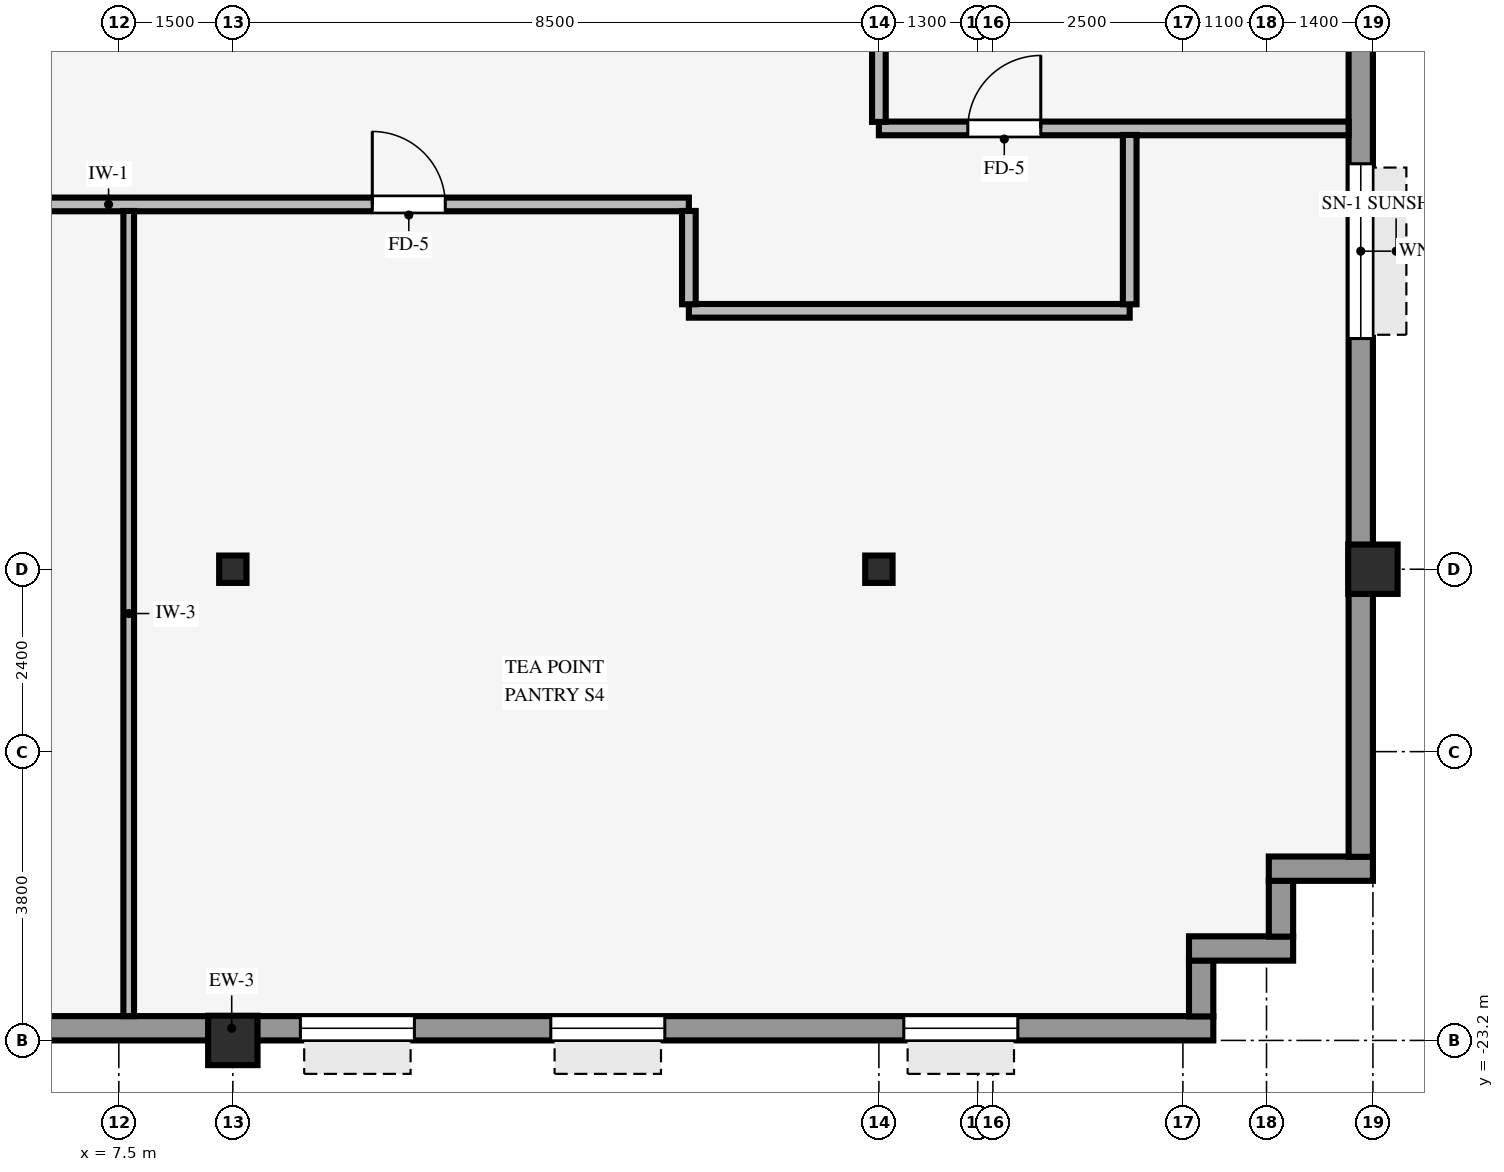
"""IFC4 building model, lengths in metres.
Left out: names, types, materials, properties, quantities, classifications, styles, units other than length and angle.
Written with IfcOpenShell. Run it as: python <this file> out.ifc"""

import sys

from ifc_helpers import new_model, si_unit, direction, frame, frame_2d, origin, origin_2d, place, context, subcontext, project, spatial, rectangle, hollow_rectangle, i_section, extrude, source, transform, mapped, element, fill, save


model = new_model("IFC4")
c1 = context("Model", 3, precision=1e-05, world=origin(), true_north=direction((0.0, 1.0)))
c2 = subcontext(c1, "Body", "Model", "MODEL_VIEW")
j1 = project(units=[si_unit("LENGTHUNIT", "METRE"), si_unit("PLANEANGLEUNIT", "RADIAN")], contexts=[c1])
p1 = place(None, origin())
s1 = spatial("IfcSite", under=j1, at=p1, CompositionType="ELEMENT")
p2 = place(p1, origin())
s2 = spatial("IfcBuilding", under=s1, at=p2, CompositionType="ELEMENT")
p3 = place(p2, frame((0.0, 0.0, 112.9)))
s3 = spatial("IfcBuildingStorey", under=s2, at=p3, CompositionType="ELEMENT", Elevation=112.9)
for number, where, z_axis, x_axis in (
    (1, (24.0, -17.0, 0.0), (0.0, 0.0, 1.0), (1.0, 0.0, 0.0)),
    (2, (9.0, -23.2, 0.0), (0.0, 0.0, 1.0), (1.0, 0.0, 0.0)),
):
    element("IfcColumn", number, at=place(p3, frame(where, z_axis=z_axis, x_axis=x_axis)), inside=s3, PredefinedType="COLUMN", context=c2, shape_type="SweptSolid", body=[
        extrude(hollow_rectangle(XDim=0.65, YDim=0.65, WallThickness=0.04, InnerFilletRadius=0.04, OuterFilletRadius=0.08, at=origin_2d()), origin(), (0.0, 0.0, 1.0), 3.25),
    ])
for number, where, z_axis, x_axis in (
    (3, (9.0, -17.0, 0.0), (0.0, 0.0, 1.0), (1.0, 0.0, 0.0)),
    (4, (17.5, -17.0, 0.0), (0.0, 0.0, 1.0), (1.0, 0.0, 0.0)),
):
    element("IfcColumn", number, at=place(p3, frame(where, z_axis=z_axis, x_axis=x_axis)), inside=s3, PredefinedType="COLUMN", context=c2, shape_type="SweptSolid", body=[
        extrude(i_section(OverallWidth=0.36, OverallDepth=0.36, WebThickness=0.021, FlangeThickness=0.021, FilletRadius=0.018, at=origin_2d()), origin(), (0.0, 0.0, 1.0), 3.25),
    ])
p4 = place(p3, frame((-21.9, -23.04, 0.0), z_axis=(0.0, 0.0, 1.0), x_axis=(1.0, 0.0, 0.0)))
e5 = element("IfcWall", 5, at=p4, inside=s3, PredefinedType="STANDARD", context=c2, shape_type="SweptSolid", body=[
    extrude(rectangle(XDim=43.8, YDim=0.32, at=frame_2d((21.9, 0.0))), origin(), (0.0, 0.0, 1.0), 2.585),
])
p5 = place(p4, frame((17.55, 0.0, 0.0), z_axis=(0.0, 0.0, 1.0), x_axis=(-1.0, 0.0, 0.0)))
e6 = element("IfcOpeningElement", 6, at=p5, cuts=e5, PredefinedType="OPENING", context=c2, shape_type="SweptSolid", body=[
    extrude(rectangle(XDim=1.05, YDim=2.1, at=frame_2d((0.525, 1.05))), frame((0.0, 0.17, 0.0), z_axis=(0.0, -1.0, 0.0), x_axis=(1.0, 0.0, 0.0)), (0.0, 0.0, 1.0), 0.34),
])
p6 = place(p4, frame((2.572, 0.0, 0.8)))
e7 = element("IfcOpeningElement", 7, at=p6, cuts=e5, PredefinedType="OPENING", context=c2, shape_type="SweptSolid", body=[
    extrude(rectangle(XDim=1.5, YDim=1.6, at=frame_2d((0.75, 0.8))), frame((0.0, 0.17, 0.0), z_axis=(0.0, -1.0, 0.0), x_axis=(1.0, 0.0, 0.0)), (0.0, 0.0, 1.0), 0.34),
])
p7 = place(p4, frame((6.767, 0.0, 0.8)))
e8 = element("IfcOpeningElement", 8, at=p7, cuts=e5, PredefinedType="OPENING", context=c2, shape_type="SweptSolid", body=[
    extrude(rectangle(XDim=1.5, YDim=1.6, at=frame_2d((0.75, 0.8))), frame((0.0, 0.17, 0.0), z_axis=(0.0, -1.0, 0.0), x_axis=(1.0, 0.0, 0.0)), (0.0, 0.0, 1.0), 0.34),
])
p8 = place(p4, frame((10.511, 0.0, 0.8)))
e9 = element("IfcOpeningElement", 9, at=p8, cuts=e5, PredefinedType="OPENING", context=c2, shape_type="SweptSolid", body=[
    extrude(rectangle(XDim=1.5, YDim=1.6, at=frame_2d((0.75, 0.8))), frame((0.0, 0.17, 0.0), z_axis=(0.0, -1.0, 0.0), x_axis=(1.0, 0.0, 0.0)), (0.0, 0.0, 1.0), 0.34),
])
p9 = place(p4, frame((25.794, 0.0, 0.8)))
e10 = element("IfcOpeningElement", 10, at=p9, cuts=e5, PredefinedType="OPENING", context=c2, shape_type="SweptSolid", body=[
    extrude(rectangle(XDim=1.5, YDim=1.6, at=frame_2d((0.75, 0.8))), frame((0.0, 0.17, 0.0), z_axis=(0.0, -1.0, 0.0), x_axis=(1.0, 0.0, 0.0)), (0.0, 0.0, 1.0), 0.34),
])
p10 = place(p4, frame((31.789, 0.0, 0.8)))
e11 = element("IfcOpeningElement", 11, at=p10, cuts=e5, PredefinedType="OPENING", context=c2, shape_type="SweptSolid", body=[
    extrude(rectangle(XDim=1.5, YDim=1.6, at=frame_2d((0.75, 0.8))), frame((0.0, 0.17, 0.0), z_axis=(0.0, -1.0, 0.0), x_axis=(1.0, 0.0, 0.0)), (0.0, 0.0, 1.0), 0.34),
])
p11 = place(p4, frame((35.083, 0.0, 0.8)))
e12 = element("IfcOpeningElement", 12, at=p11, cuts=e5, PredefinedType="OPENING", context=c2, shape_type="SweptSolid", body=[
    extrude(rectangle(XDim=1.5, YDim=1.6, at=frame_2d((0.75, 0.8))), frame((0.0, 0.17, 0.0), z_axis=(0.0, -1.0, 0.0), x_axis=(1.0, 0.0, 0.0)), (0.0, 0.0, 1.0), 0.34),
])
p12 = place(p4, frame((39.728, 0.0, 0.8)))
e13 = element("IfcOpeningElement", 13, at=p12, cuts=e5, PredefinedType="OPENING", context=c2, shape_type="SweptSolid", body=[
    extrude(rectangle(XDim=1.5, YDim=1.6, at=frame_2d((0.75, 0.8))), frame((0.0, 0.17, 0.0), z_axis=(0.0, -1.0, 0.0), x_axis=(1.0, 0.0, 0.0)), (0.0, 0.0, 1.0), 0.34),
])
p13 = place(p3, frame((21.74, -22.884, 0.0), z_axis=(0.0, 0.0, 1.0), x_axis=(0.0, 1.0, 0.0)))
e14 = element("IfcWall", 14, at=p13, inside=s3, PredefinedType="STANDARD", context=c2, shape_type="SweptSolid", body=[
    extrude(rectangle(XDim=0.738, YDim=0.32, at=frame_2d((0.369, 0.0))), origin(), (0.0, 0.0, 1.0), 3.24),
])
p14 = place(p3, frame((21.58, -21.99, 0.0), z_axis=(0.0, 0.0, 1.0), x_axis=(1.0, 0.0, 0.0)))
e15 = element("IfcWall", 15, at=p14, inside=s3, PredefinedType="STANDARD", context=c2, shape_type="SweptSolid", body=[
    extrude(rectangle(XDim=1.37, YDim=0.32, at=frame_2d((0.685, 0.0))), origin(), (0.0, 0.0, 1.0), 3.24),
])
p15 = place(p3, frame((22.79, -21.834, 0.0), z_axis=(0.0, 0.0, 1.0), x_axis=(0.0, 1.0, 0.0)))
e16 = element("IfcWall", 16, at=p15, inside=s3, PredefinedType="STANDARD", context=c2, shape_type="SweptSolid", body=[
    extrude(rectangle(XDim=0.738, YDim=0.32, at=frame_2d((0.369, 0.0))), origin(), (0.0, 0.0, 1.0), 3.24),
])
p16 = place(p3, frame((22.63, -20.94, 0.0), z_axis=(0.0, 0.0, 1.0), x_axis=(1.0, 0.0, 0.0)))
e17 = element("IfcWall", 17, at=p16, inside=s3, PredefinedType="STANDARD", context=c2, shape_type="SweptSolid", body=[
    extrude(rectangle(XDim=1.37, YDim=0.32, at=frame_2d((0.685, 0.0))), origin(), (0.0, 0.0, 1.0), 3.24),
])
p17 = place(p3, frame((23.84, -20.784, 0.0), z_axis=(0.0, 0.0, 1.0), x_axis=(0.0, 1.0, 0.0)))
e18 = element("IfcWall", 18, at=p17, inside=s3, PredefinedType="STANDARD", context=c2, shape_type="SweptSolid", body=[
    extrude(rectangle(XDim=41.568, YDim=0.32, at=frame_2d((20.784, 0.0))), origin(), (0.0, 0.0, 1.0), 3.24),
])
p18 = place(p17, frame((6.819, 0.0, 0.8)))
e19 = element("IfcOpeningElement", 19, at=p18, cuts=e18, PredefinedType="OPENING", context=c2, shape_type="SweptSolid", body=[
    extrude(rectangle(XDim=2.3, YDim=1.62, at=frame_2d((1.15, 0.81))), frame((0.0, 0.17, 0.0), z_axis=(0.0, -1.0, 0.0), x_axis=(1.0, 0.0, 0.0)), (0.0, 0.0, 1.0), 0.34),
])
p19 = place(p17, frame((17.161, 0.0, 0.8)))
e20 = element("IfcOpeningElement", 20, at=p19, cuts=e18, PredefinedType="OPENING", context=c2, shape_type="SweptSolid", body=[
    extrude(rectangle(XDim=2.3, YDim=1.62, at=frame_2d((1.15, 0.81))), frame((0.0, 0.17, 0.0), z_axis=(0.0, -1.0, 0.0), x_axis=(1.0, 0.0, 0.0)), (0.0, 0.0, 1.0), 0.34),
])
p20 = place(p17, frame((22.107, 0.0, 0.8)))
e21 = element("IfcOpeningElement", 21, at=p20, cuts=e18, PredefinedType="OPENING", context=c2, shape_type="SweptSolid", body=[
    extrude(rectangle(XDim=2.3, YDim=1.62, at=frame_2d((1.15, 0.81))), frame((0.0, 0.17, 0.0), z_axis=(0.0, -1.0, 0.0), x_axis=(1.0, 0.0, 0.0)), (0.0, 0.0, 1.0), 0.34),
])
p21 = place(p17, frame((32.449, 0.0, 0.8)))
e22 = element("IfcOpeningElement", 22, at=p21, cuts=e18, PredefinedType="OPENING", context=c2, shape_type="SweptSolid", body=[
    extrude(rectangle(XDim=2.3, YDim=1.62, at=frame_2d((1.15, 0.81))), frame((0.0, 0.17, 0.0), z_axis=(0.0, -1.0, 0.0), x_axis=(1.0, 0.0, 0.0)), (0.0, 0.0, 1.0), 0.34),
])
p22 = place(p3, frame((15.0, -13.6, 0.0), z_axis=(0.0, 0.0, 1.0), x_axis=(1.0, 0.0, 0.0)))
e23 = element("IfcWall", 23, at=p22, inside=s3, PredefinedType="PARTITIONING", context=c2, shape_type="SweptSolid", body=[
    extrude(rectangle(XDim=5.8, YDim=0.18, at=frame_2d((2.9, 0.0))), origin(), (0.0, 0.0, 1.0), 2.878),
])
p23 = place(p3, frame((-15.0, -12.2, 0.0), z_axis=(0.0, 0.0, 1.0), x_axis=(1.0, 0.0, 0.0)))
e24 = element("IfcWall", 24, at=p23, inside=s3, PredefinedType="PARTITIONING", context=c2, shape_type="SweptSolid", body=[
    extrude(rectangle(XDim=30.0, YDim=0.18, at=frame_2d((15.0, 0.0))), origin(), (0.0, 0.0, 1.0), 3.24),
])
p24 = place(p23, frame((17.935, 0.0, 0.0)))
e25 = element("IfcOpeningElement", 25, at=p24, cuts=e24, PredefinedType="OPENING", context=c2, shape_type="SweptSolid", body=[
    extrude(rectangle(XDim=0.96, YDim=2.1, at=frame_2d((0.48, 1.05))), frame((0.0, 0.1, 0.0), z_axis=(0.0, -1.0, 0.0), x_axis=(1.0, 0.0, 0.0)), (0.0, 0.0, 1.0), 0.2),
])
p25 = place(p23, frame((25.835, 0.0, 0.0)))
e26 = element("IfcOpeningElement", 26, at=p25, cuts=e24, PredefinedType="OPENING", context=c2, shape_type="SweptSolid", body=[
    extrude(rectangle(XDim=0.96, YDim=2.1, at=frame_2d((0.48, 1.05))), frame((0.0, 0.1, 0.0), z_axis=(0.0, -1.0, 0.0), x_axis=(1.0, 0.0, 0.0)), (0.0, 0.0, 1.0), 0.2),
])
p26 = place(p23, frame((5.45, 0.0, 0.0)))
e27 = element("IfcOpeningElement", 27, at=p26, cuts=e24, PredefinedType="OPENING", context=c2, shape_type="SweptSolid", body=[
    extrude(rectangle(XDim=0.9, YDim=2.1, at=frame_2d((0.45, 1.05))), frame((0.0, 0.1, 0.0), z_axis=(0.0, -1.0, 0.0), x_axis=(1.0, 0.0, 0.0)), (0.0, 0.0, 1.0), 0.2),
])
p27 = place(p23, frame((2.85, 0.0, 0.0)))
e28 = element("IfcOpeningElement", 28, at=p27, cuts=e24, PredefinedType="OPENING", context=c2, shape_type="SweptSolid", body=[
    extrude(rectangle(XDim=0.9, YDim=2.1, at=frame_2d((0.45, 1.05))), frame((0.0, 0.1, 0.0), z_axis=(0.0, -1.0, 0.0), x_axis=(1.0, 0.0, 0.0)), (0.0, 0.0, 1.0), 0.2),
])
p28 = place(p23, frame((12.52, 0.0, 0.0)))
e29 = element("IfcOpeningElement", 29, at=p28, cuts=e24, PredefinedType="OPENING", context=c2, shape_type="SweptSolid", body=[
    extrude(rectangle(XDim=0.96, YDim=2.1, at=frame_2d((0.48, 1.05))), frame((0.0, 0.1, 0.0), z_axis=(0.0, -1.0, 0.0), x_axis=(1.0, 0.0, 0.0)), (0.0, 0.0, 1.0), 0.2),
])
p29 = place(p23, frame((7.95, 0.0, 0.0)))
e30 = element("IfcOpeningElement", 30, at=p29, cuts=e24, PredefinedType="OPENING", context=c2, shape_type="SweptSolid", body=[
    extrude(rectangle(XDim=0.9, YDim=2.1, at=frame_2d((0.45, 1.05))), frame((0.0, 0.1, 0.0), z_axis=(0.0, -1.0, 0.0), x_axis=(1.0, 0.0, 0.0)), (0.0, 0.0, 1.0), 0.2),
])
p30 = place(p3, frame((17.5, -11.2, 0.0), z_axis=(0.0, 0.0, 1.0), x_axis=(1.0, 0.0, 0.0)))
e31 = element("IfcWall", 31, at=p30, inside=s3, PredefinedType="PARTITIONING", context=c2, shape_type="SweptSolid", body=[
    extrude(rectangle(XDim=6.18, YDim=0.18, at=frame_2d((3.09, 0.0))), origin(), (0.0, 0.0, 1.0), 3.24),
])
p31 = place(p30, frame((1.17, 0.0, 0.0)))
e32 = element("IfcOpeningElement", 32, at=p31, cuts=e31, PredefinedType="OPENING", context=c2, shape_type="SweptSolid", body=[
    extrude(rectangle(XDim=0.96, YDim=2.1, at=frame_2d((0.48, 1.05))), frame((0.0, 0.1, 0.0), z_axis=(0.0, -1.0, 0.0), x_axis=(1.0, 0.0, 0.0)), (0.0, 0.0, 1.0), 0.2),
])
p32 = place(p3, frame((7.63, -22.88, 0.0), z_axis=(0.0, 0.0, 1.0), x_axis=(0.0, 1.0, 0.0)))
e33 = element("IfcWall", 33, at=p32, inside=s3, PredefinedType="PARTITIONING", context=c2, shape_type="SweptSolid", body=[
    extrude(rectangle(XDim=10.594, YDim=0.14, at=frame_2d((5.297, 0.0))), origin(), (0.0, 0.0, 1.0), 3.24),
])
p33 = place(p3, frame((15.0, -13.514, 0.0), z_axis=(0.0, 0.0, 1.0), x_axis=(0.0, 1.0, 0.0)))
e34 = element("IfcWall", 34, at=p33, inside=s3, PredefinedType="PARTITIONING", context=c2, shape_type="SweptSolid", body=[
    extrude(rectangle(XDim=1.228, YDim=0.18, at=frame_2d((0.614, 0.0))), origin(), (0.0, 0.0, 1.0), 3.24),
])
p34 = place(p3, frame((17.5, -11.114, 0.0), z_axis=(0.0, 0.0, 1.0), x_axis=(0.0, 1.0, 0.0)))
e35 = element("IfcWall", 35, at=p34, inside=s3, PredefinedType="PARTITIONING", context=c2, shape_type="SweptSolid", body=[
    extrude(rectangle(XDim=0.968, YDim=0.18, at=frame_2d((0.484, 0.0))), origin(), (0.0, 0.0, 1.0), 2.618),
])
p35 = place(p3, frame((20.8, -13.514, 0.0), z_axis=(0.0, 0.0, 1.0), x_axis=(0.0, 1.0, 0.0)))
e36 = element("IfcWall", 36, at=p35, inside=s3, PredefinedType="PARTITIONING", context=c2, shape_type="SweptSolid", body=[
    extrude(rectangle(XDim=2.228, YDim=0.18, at=frame_2d((1.114, 0.0))), origin(), (0.0, 0.0, 1.0), 3.24),
])
m1 = source(origin(), c2, "Body", "SweptSolid", [
    extrude(rectangle(XDim=1.5, YDim=1.6, at=frame_2d((0.75, 0.8))), frame((0.0, 0.03, 0.0), z_axis=(0.0, -1.0, 0.0), x_axis=(1.0, 0.0, 0.0)), (0.0, 0.0, 1.0), 0.06),
])
p36 = place(p10, origin())
e37 = element("IfcWindow", 37, at=p36, inside=s3, PartitioningType="SINGLE_PANEL", PredefinedType="WINDOW", context=c2, shape_type="MappedRepresentation", body=[
    mapped(m1, transform((0.0, 0.0, 0.0), scale=1.0)),
])
fill(e11, e37)
p37 = place(p11, origin())
e38 = element("IfcWindow", 38, at=p37, inside=s3, PartitioningType="SINGLE_PANEL", PredefinedType="WINDOW", context=c2, shape_type="MappedRepresentation", body=[
    mapped(m1, transform((0.0, 0.0, 0.0), scale=1.0)),
])
fill(e12, e38)
p38 = place(p12, origin())
e39 = element("IfcWindow", 39, at=p38, inside=s3, PartitioningType="SINGLE_PANEL", PredefinedType="WINDOW", context=c2, shape_type="MappedRepresentation", body=[
    mapped(m1, transform((0.0, 0.0, 0.0), scale=1.0)),
])
fill(e13, e39)
m2 = source(origin(), c2, "Body", "SweptSolid", [
    extrude(rectangle(XDim=2.3, YDim=1.62, at=frame_2d((1.15, 0.81))), frame((0.0, 0.03, 0.0), z_axis=(0.0, -1.0, 0.0), x_axis=(1.0, 0.0, 0.0)), (0.0, 0.0, 1.0), 0.06),
])
p39 = place(p18, origin())
e40 = element("IfcWindow", 40, at=p39, inside=s3, PartitioningType="SINGLE_PANEL", PredefinedType="WINDOW", context=c2, shape_type="MappedRepresentation", body=[
    mapped(m2, transform((0.0, 0.0, 0.0), scale=1.0)),
])
fill(e19, e40)
m3 = source(origin(), c2, "Body", "SweptSolid", [
    extrude(rectangle(XDim=0.96, YDim=2.1, at=frame_2d((0.48, 1.05))), frame((0.0, 0.025, 0.0), z_axis=(0.0, -1.0, 0.0), x_axis=(1.0, 0.0, 0.0)), (0.0, 0.0, 1.0), 0.05),
])
p40 = place(p25, origin())
e41 = element("IfcDoor", 41, at=p40, inside=s3, OperationType="SINGLE_SWING_LEFT", PredefinedType="DOOR", context=c2, shape_type="MappedRepresentation", body=[
    mapped(m3, transform((0.0, 0.0, 0.0), scale=1.0)),
])
fill(e26, e41)
p41 = place(p31, origin())
e42 = element("IfcDoor", 42, at=p41, inside=s3, OperationType="SINGLE_SWING_RIGHT", PredefinedType="DOOR", context=c2, shape_type="MappedRepresentation", body=[
    mapped(m3, transform((0.0, 0.0, 0.0), scale=1.0)),
])
fill(e32, e42)
save(model, sys.argv[1])
